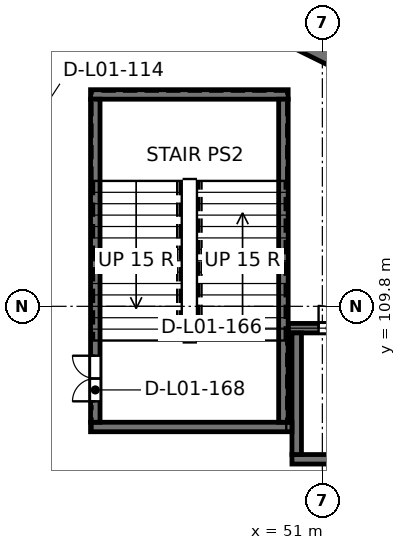
"""IFC4 building model, lengths in metres.
Left out: names, types, materials, properties, quantities, classifications, styles, units other than length and angle.
Written with IfcOpenShell. Run it as: python <this file> out.ifc"""

import sys

from ifc_helpers import new_model, si_unit, direction, frame, frame_2d, origin, place, context, subcontext, project, spatial, rectangle, extrude, element, fill, save


model = new_model("IFC4")
c1 = context("Model", 3, precision=1e-05, world=origin(), true_north=direction((0.0, 1.0)))
c2 = subcontext(c1, "Body", "Model", "MODEL_VIEW")
j1 = project(units=[si_unit("LENGTHUNIT", "METRE"), si_unit("PLANEANGLEUNIT", "RADIAN")], contexts=[c1])
p1 = place(None, origin())
s1 = spatial("IfcSite", under=j1, at=p1, CompositionType="ELEMENT")
p2 = place(p1, origin())
s2 = spatial("IfcBuilding", under=s1, at=p2, CompositionType="ELEMENT")
p3 = place(p2, frame((0.0, 0.0, 4.8)))
s3 = spatial("IfcBuildingStorey", under=s2, at=p3, CompositionType="ELEMENT", Elevation=4.8)
p4 = place(p3, frame((51.887, 116.063, 0.0), z_axis=(0.0, 0.0, 1.0), x_axis=(-0.896822873966, 0.442389797274, 0.0)))
e1 = element("IfcWall", 1, at=p4, inside=s3, PredefinedType="SOLIDWALL", context=c2, shape_type="SweptSolid", body=[
    extrude(rectangle(XDim=2.433, YDim=0.5, at=frame_2d((1.216, 0.0))), origin(), (0.0, 0.0, 1.0), 4.8),
])
p5 = place(p3, frame((50.2, 105.775, 0.0), z_axis=(0.0, 0.0, 1.0), x_axis=(1.0, 0.0, 0.0)))
e2 = element("IfcWall", 2, at=p5, inside=s3, PredefinedType="SOLIDWALL", context=c2, shape_type="SweptSolid", body=[
    extrude(rectangle(XDim=7.4, YDim=0.25, at=frame_2d((3.7, 0.0))), origin(), (0.0, 0.0, 1.0), 4.8),
])
p6 = place(p3, frame((50.1, 109.225, 0.0), z_axis=(0.0, 0.0, 1.0), x_axis=(1.0, 0.0, 0.0)))
e3 = element("IfcWall", 3, at=p6, inside=s3, PredefinedType="SOLIDWALL", context=c2, shape_type="SweptSolid", body=[
    extrude(rectangle(XDim=7.5, YDim=0.25, at=frame_2d((3.75, 0.0))), origin(), (0.0, 0.0, 1.0), 4.8),
])
p7 = place(p6, frame((0.8, 0.0, 0.0)))
e4 = element("IfcOpeningElement", 4, at=p7, cuts=e3, PredefinedType="OPENING", context=c2, shape_type="SweptSolid", body=[
    extrude(rectangle(XDim=1.2, YDim=2.1, at=frame_2d((0.6, 1.05))), frame((0.0, 0.135, 0.0), z_axis=(0.0, -1.0, 0.0), x_axis=(1.0, 0.0, 0.0)), (0.0, 0.0, 1.0), 0.27),
])
p8 = place(p3, frame((50.325, 105.9, 0.0), z_axis=(0.0, 0.0, 1.0), x_axis=(0.0, 1.0, 0.0)))
e5 = element("IfcWall", 5, at=p8, inside=s3, PredefinedType="SOLIDWALL", context=c2, shape_type="SweptSolid", body=[
    extrude(rectangle(XDim=3.2, YDim=0.25, at=frame_2d((1.6, 0.0))), origin(), (0.0, 0.0, 1.0), 4.8),
])
p9 = place(p3, frame((44.9, 106.625, 0.0), z_axis=(0.0, 0.0, 1.0), x_axis=(1.0, 0.0, 0.0)))
e6 = element("IfcWall", 6, at=p9, inside=s3, PredefinedType="SOLIDWALL", context=c2, shape_type="SweptSolid", body=[
    extrude(rectangle(XDim=5.3, YDim=0.25, at=frame_2d((2.65, 0.0))), origin(), (0.0, 0.0, 1.0), 4.8),
])
p10 = place(p3, frame((44.9, 115.375, 0.0), z_axis=(0.0, 0.0, 1.0), x_axis=(1.0, 0.0, 0.0)))
e7 = element("IfcWall", 7, at=p10, inside=s3, PredefinedType="SOLIDWALL", context=c2, shape_type="SweptSolid", body=[
    extrude(rectangle(XDim=5.2, YDim=0.25, at=frame_2d((2.6, 0.0))), origin(), (0.0, 0.0, 1.0), 4.8),
])
p11 = place(p3, frame((45.025, 106.75, 0.0), z_axis=(0.0, 0.0, 1.0), x_axis=(0.0, 1.0, 0.0)))
e8 = element("IfcWall", 8, at=p11, inside=s3, PredefinedType="SOLIDWALL", context=c2, shape_type="SweptSolid", body=[
    extrude(rectangle(XDim=8.5, YDim=0.25, at=frame_2d((4.25, 0.0))), origin(), (0.0, 0.0, 1.0), 4.8),
])
p12 = place(p11, frame((0.55, 0.0, 0.0)))
e9 = element("IfcOpeningElement", 9, at=p12, cuts=e8, PredefinedType="OPENING", context=c2, shape_type="SweptSolid", body=[
    extrude(rectangle(XDim=1.2, YDim=2.1, at=frame_2d((0.6, 1.05))), frame((0.0, 0.135, 0.0), z_axis=(0.0, -1.0, 0.0), x_axis=(1.0, 0.0, 0.0)), (0.0, 0.0, 1.0), 0.27),
])
p13 = place(p3, frame((49.975, 106.75, 0.0), z_axis=(0.0, 0.0, 1.0), x_axis=(0.0, 1.0, 0.0)))
e10 = element("IfcWall", 10, at=p13, inside=s3, PredefinedType="SOLIDWALL", context=c2, shape_type="SweptSolid", body=[
    extrude(rectangle(XDim=8.5, YDim=0.25, at=frame_2d((4.25, 0.0))), origin(), (0.0, 0.0, 1.0), 4.8),
])
p14 = place(p7, origin())
e11 = element("IfcDoor", 11, at=p14, inside=s3, OperationType="DOUBLE_DOOR_SINGLE_SWING", PredefinedType="DOOR", context=c2, shape_type="SweptSolid", body=[
    extrude(rectangle(XDim=1.2, YDim=2.1, at=frame_2d((0.6, 1.05))), frame((0.0, 0.025, 0.0), z_axis=(0.0, -1.0, 0.0), x_axis=(1.0, 0.0, 0.0)), (0.0, 0.0, 1.0), 0.05),
])
fill(e4, e11)
p15 = place(p12, origin())
e12 = element("IfcDoor", 12, at=p15, inside=s3, OperationType="DOUBLE_DOOR_SINGLE_SWING", PredefinedType="DOOR", context=c2, shape_type="SweptSolid", body=[
    extrude(rectangle(XDim=1.2, YDim=2.1, at=frame_2d((0.6, 1.05))), frame((0.0, 0.025, 0.0), z_axis=(0.0, -1.0, 0.0), x_axis=(1.0, 0.0, 0.0)), (0.0, 0.0, 1.0), 0.05),
])
fill(e9, e12)
save(model, sys.argv[1])
